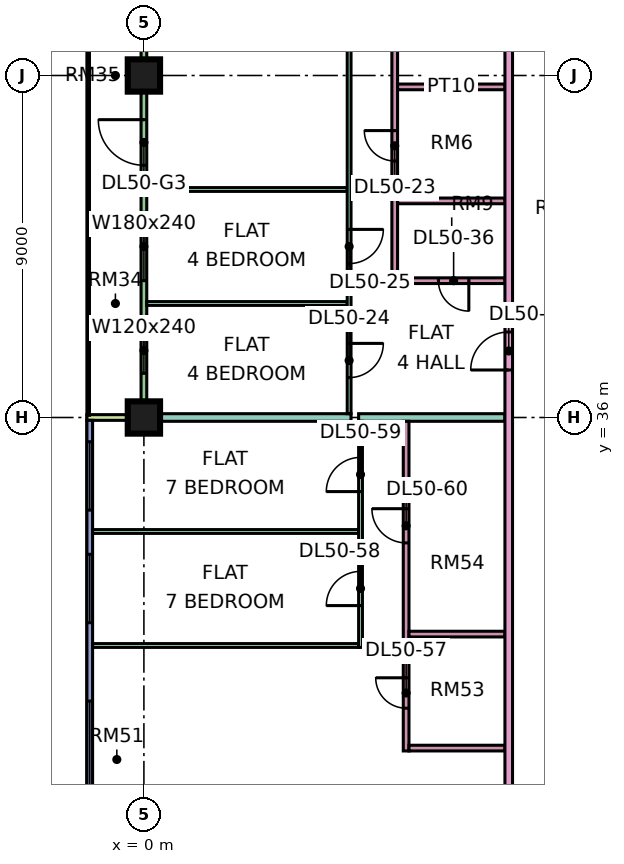
"""IFC4 building model, lengths in metres.
Left out: names, types, materials, properties, quantities, classifications, styles, units other than length and angle.
Written with IfcOpenShell. Run it as: python <this file> out.ifc"""

import sys

from ifc_helpers import new_model, si_unit, direction, frame, frame_2d, origin, origin_2d, place, context, subcontext, project, spatial, rectangle, extrude, element, fill, save


model = new_model("IFC4")
c1 = context("Model", 3, precision=1e-05, world=origin(), true_north=direction((0.0, 1.0)))
c2 = subcontext(c1, "Body", "Model", "MODEL_VIEW")
j1 = project(units=[si_unit("LENGTHUNIT", "METRE"), si_unit("PLANEANGLEUNIT", "RADIAN")], contexts=[c1])
p1 = place(None, origin())
s1 = spatial("IfcSite", under=j1, at=p1, CompositionType="ELEMENT")
p2 = place(p1, origin())
s2 = spatial("IfcBuilding", under=s1, at=p2, CompositionType="ELEMENT")
p3 = place(p2, frame((0.0, 0.0, 215.4)))
s3 = spatial("IfcBuildingStorey", under=s2, at=p3, CompositionType="ELEMENT", Elevation=215.4)
p4 = place(p3, frame((0.0, 36.0, 0.0), z_axis=(0.0, 0.0, 1.0), x_axis=(1.0, 0.0, 0.0)))
e1 = element("IfcColumn", 1, at=p4, inside=s3, PredefinedType="COLUMN", context=c2, shape_type="SweptSolid", body=[
    extrude(rectangle(XDim=0.85, YDim=0.85, at=origin_2d()), origin(), (0.0, 0.0, 1.0), 3.75),
])
p5 = place(p3, frame((0.0, 45.0, 0.0), z_axis=(0.0, 0.0, 1.0), x_axis=(1.0, 0.0, 0.0)))
e2 = element("IfcColumn", 2, at=p5, inside=s3, PredefinedType="COLUMN", context=c2, shape_type="SweptSolid", body=[
    extrude(rectangle(XDim=0.85, YDim=0.85, at=origin_2d()), origin(), (0.0, 0.0, 1.0), 3.75),
])
p6 = place(p3, frame((0.0, 47.925, 0.0), z_axis=(0.0, 0.0, 1.0), x_axis=(0.0, -1.0, 0.0)))
e3 = element("IfcWall", 3, at=p6, inside=s3, PredefinedType="SOLIDWALL", context=c2, shape_type="SweptSolid", body=[
    extrude(rectangle(XDim=11.85, YDim=0.15, at=frame_2d((5.925, 0.0))), origin(), (0.0, 0.0, 1.0), 3.35),
])
p7 = place(p6, frame((0.6, 0.0, 0.45)))
e4 = element("IfcOpeningElement", 4, at=p7, cuts=e3, PredefinedType="OPENING", context=c2, shape_type="SweptSolid", body=[
    extrude(rectangle(XDim=1.2, YDim=2.4, at=frame_2d((0.6, 1.2))), frame((0.0, 0.085, 0.0), z_axis=(0.0, -1.0, 0.0), x_axis=(1.0, 0.0, 0.0)), (0.0, 0.0, 1.0), 0.17),
])
p8 = place(p6, frame((4.087, 0.0, 0.0)))
e5 = element("IfcOpeningElement", 5, at=p8, cuts=e3, PredefinedType="OPENING", context=c2, shape_type="SweptSolid", body=[
    extrude(rectangle(XDim=1.2, YDim=2.4, at=frame_2d((0.6, 1.2))), frame((0.0, 0.085, 0.0), z_axis=(0.0, -1.0, 0.0), x_axis=(1.0, 0.0, 0.0)), (0.0, 0.0, 1.0), 0.17),
])
p9 = place(p6, frame((6.525, 0.0, 0.45)))
e6 = element("IfcOpeningElement", 6, at=p9, cuts=e3, PredefinedType="OPENING", context=c2, shape_type="SweptSolid", body=[
    extrude(rectangle(XDim=1.8, YDim=2.4, at=frame_2d((0.9, 1.2))), frame((0.0, 0.085, 0.0), z_axis=(0.0, -1.0, 0.0), x_axis=(1.0, 0.0, 0.0)), (0.0, 0.0, 1.0), 0.17),
])
p10 = place(p6, frame((9.562, 0.0, 0.45)))
e7 = element("IfcOpeningElement", 7, at=p10, cuts=e3, PredefinedType="OPENING", context=c2, shape_type="SweptSolid", body=[
    extrude(rectangle(XDim=1.2, YDim=2.4, at=frame_2d((0.6, 1.2))), frame((0.0, 0.085, 0.0), z_axis=(0.0, -1.0, 0.0), x_axis=(1.0, 0.0, 0.0)), (0.0, 0.0, 1.0), 0.17),
])
p11 = place(p3, frame((-1.5, 36.0, 0.0), z_axis=(0.0, 0.0, 1.0), x_axis=(1.0, 0.0, 0.0)))
e8 = element("IfcWall", 8, at=p11, inside=s3, PredefinedType="SOLIDWALL", context=c2, shape_type="SweptSolid", body=[
    extrude(rectangle(XDim=1.5, YDim=0.15, at=frame_2d((0.75, 0.0))), origin(), (0.0, 0.0, 1.0), 3.35),
])
p12 = place(p3, frame((-1.425, 35.925, 0.0), z_axis=(0.0, 0.0, 1.0), x_axis=(0.0, -1.0, 0.0)))
e9 = element("IfcWall", 9, at=p12, inside=s3, PredefinedType="SOLIDWALL", context=c2, shape_type="SweptSolid", body=[
    extrude(rectangle(XDim=11.85, YDim=0.15, at=frame_2d((5.925, 0.0))), origin(), (0.0, 0.0, 1.0), 3.35),
])
p13 = place(p12, frame((0.562, 0.0, 0.45)))
e10 = element("IfcOpeningElement", 10, at=p13, cuts=e9, PredefinedType="OPENING", context=c2, shape_type="SweptSolid", body=[
    extrude(rectangle(XDim=1.8, YDim=2.4, at=frame_2d((0.9, 1.2))), frame((0.0, 0.085, 0.0), z_axis=(0.0, -1.0, 0.0), x_axis=(1.0, 0.0, 0.0)), (0.0, 0.0, 1.0), 0.17),
])
p14 = place(p12, frame((3.525, 0.0, 0.45)))
e11 = element("IfcOpeningElement", 11, at=p14, cuts=e9, PredefinedType="OPENING", context=c2, shape_type="SweptSolid", body=[
    extrude(rectangle(XDim=1.8, YDim=2.4, at=frame_2d((0.9, 1.2))), frame((0.0, 0.085, 0.0), z_axis=(0.0, -1.0, 0.0), x_axis=(1.0, 0.0, 0.0)), (0.0, 0.0, 1.0), 0.17),
])
p15 = place(p12, frame((7.387, 0.0, 0.45)))
e12 = element("IfcOpeningElement", 12, at=p15, cuts=e9, PredefinedType="OPENING", context=c2, shape_type="SweptSolid", body=[
    extrude(rectangle(XDim=3.0, YDim=2.4, at=frame_2d((1.5, 1.2))), frame((0.0, 0.085, 0.0), z_axis=(0.0, -1.0, 0.0), x_axis=(1.0, 0.0, 0.0)), (0.0, 0.0, 1.0), 0.17),
])
p16 = place(p3, frame((-1.351, 33.0, 0.0), z_axis=(0.0, 0.0, 1.0), x_axis=(1.0, 0.0, 0.0)))
e13 = element("IfcWall", 13, at=p16, inside=s3, PredefinedType="PARTITIONING", context=c2, shape_type="SweptSolid", body=[
    extrude(rectangle(XDim=7.001, YDim=0.1, at=frame_2d((3.5, 0.0))), origin(), (0.0, 0.0, 1.0), 3.35),
])
p17 = place(p3, frame((-1.35, 30.0, 0.0), z_axis=(0.0, 0.0, 1.0), x_axis=(1.0, 0.0, 0.0)))
e14 = element("IfcWall", 14, at=p17, inside=s3, PredefinedType="PARTITIONING", context=c2, shape_type="SweptSolid", body=[
    extrude(rectangle(XDim=7.0, YDim=0.1, at=frame_2d((3.5, 0.0))), origin(), (0.0, 0.0, 1.0), 3.35),
])
e15 = element("IfcWall", 15, at=p4, inside=s3, PredefinedType="PARTITIONING", context=c2, shape_type="SweptSolid", body=[
    extrude(rectangle(XDim=5.45, YDim=0.2, at=frame_2d((2.725, 0.0))), origin(), (0.0, 0.0, 1.0), 3.35),
])
for number, where, z_axis, x_axis in (
    (16, (0.074, 39.0, 0.0), (0.0, 0.0, 1.0), (1.0, 0.0, 0.0)),
    (17, (0.074, 42.0, 0.0), (0.0, 0.0, 1.0), (1.0, 0.0, 0.0)),
):
    element("IfcWall", number, at=place(p3, frame(where, z_axis=z_axis, x_axis=x_axis)), inside=s3, PredefinedType="PARTITIONING", context=c2, shape_type="SweptSolid", body=[
        extrude(rectangle(XDim=5.276, YDim=0.1, at=frame_2d((2.638, 0.0))), origin(), (0.0, 0.0, 1.0), 3.35),
    ])
p18 = place(p3, frame((5.4, 36.1, 0.0), z_axis=(0.0, 0.0, 1.0), x_axis=(0.0, 1.0, 0.0)))
e18 = element("IfcWall", 18, at=p18, inside=s3, PredefinedType="PARTITIONING", context=c2, shape_type="SweptSolid", body=[
    extrude(rectangle(XDim=26.95, YDim=0.1, at=frame_2d((13.475, 0.0))), origin(), (0.0, 0.0, 1.0), 3.35),
])
p19 = place(p18, frame((0.95, 0.0, 0.0)))
e19 = element("IfcOpeningElement", 19, at=p19, cuts=e18, PredefinedType="OPENING", context=c2, shape_type="SweptSolid", body=[
    extrude(rectangle(XDim=0.9, YDim=2.1, at=frame_2d((0.45, 1.05))), frame((0.0, 0.06, 0.0), z_axis=(0.0, -1.0, 0.0), x_axis=(1.0, 0.0, 0.0)), (0.0, 0.0, 1.0), 0.12),
])
p20 = place(p18, frame((3.95, 0.0, 0.0)))
e20 = element("IfcOpeningElement", 20, at=p20, cuts=e18, PredefinedType="OPENING", context=c2, shape_type="SweptSolid", body=[
    extrude(rectangle(XDim=0.9, YDim=2.1, at=frame_2d((0.45, 1.05))), frame((0.0, 0.06, 0.0), z_axis=(0.0, -1.0, 0.0), x_axis=(1.0, 0.0, 0.0)), (0.0, 0.0, 1.0), 0.12),
])
p21 = place(p18, frame((15.95, 0.0, 0.0)))
e21 = element("IfcOpeningElement", 21, at=p21, cuts=e18, PredefinedType="OPENING", context=c2, shape_type="SweptSolid", body=[
    extrude(rectangle(XDim=0.9, YDim=2.1, at=frame_2d((0.45, 1.05))), frame((0.0, 0.06, 0.0), z_axis=(0.0, -1.0, 0.0), x_axis=(1.0, 0.0, 0.0)), (0.0, 0.0, 1.0), 0.12),
])
p22 = place(p18, frame((18.95, 0.0, 0.0)))
e22 = element("IfcOpeningElement", 22, at=p22, cuts=e18, PredefinedType="OPENING", context=c2, shape_type="SweptSolid", body=[
    extrude(rectangle(XDim=0.9, YDim=2.1, at=frame_2d((0.45, 1.05))), frame((0.0, 0.06, 0.0), z_axis=(0.0, -1.0, 0.0), x_axis=(1.0, 0.0, 0.0)), (0.0, 0.0, 1.0), 0.12),
])
p23 = place(p18, frame((21.95, 0.0, 0.0)))
e23 = element("IfcOpeningElement", 23, at=p23, cuts=e18, PredefinedType="OPENING", context=c2, shape_type="SweptSolid", body=[
    extrude(rectangle(XDim=0.9, YDim=2.1, at=frame_2d((0.45, 1.05))), frame((0.0, 0.06, 0.0), z_axis=(0.0, -1.0, 0.0), x_axis=(1.0, 0.0, 0.0)), (0.0, 0.0, 1.0), 0.12),
])
p24 = place(p18, frame((9.95, 0.0, 0.0)))
e24 = element("IfcOpeningElement", 24, at=p24, cuts=e18, PredefinedType="OPENING", context=c2, shape_type="SweptSolid", body=[
    extrude(rectangle(XDim=0.9, YDim=2.1, at=frame_2d((0.45, 1.05))), frame((0.0, 0.06, 0.0), z_axis=(0.0, -1.0, 0.0), x_axis=(1.0, 0.0, 0.0)), (0.0, 0.0, 1.0), 0.12),
])
p25 = place(p18, frame((24.55, 0.0, 0.0)))
e25 = element("IfcOpeningElement", 25, at=p25, cuts=e18, PredefinedType="OPENING", context=c2, shape_type="SweptSolid", body=[
    extrude(rectangle(XDim=1.6, YDim=2.1, at=frame_2d((0.8, 1.05))), frame((0.0, 0.06, 0.0), z_axis=(0.0, -1.0, 0.0), x_axis=(1.0, 0.0, 0.0)), (0.0, 0.0, 1.0), 0.12),
])
p26 = place(p3, frame((5.65, 36.0, 0.0), z_axis=(0.0, 0.0, 1.0), x_axis=(1.0, 0.0, 0.0)))
e26 = element("IfcWall", 26, at=p26, inside=s3, PredefinedType="PARTITIONING", context=c2, shape_type="SweptSolid", body=[
    extrude(rectangle(XDim=3.85, YDim=0.2, at=frame_2d((1.925, 0.0))), origin(), (0.0, 0.0, 1.0), 3.35),
])
p27 = place(p3, frame((5.7, 29.95, 0.0), z_axis=(0.0, 0.0, 1.0), x_axis=(0.0, 1.0, 0.0)))
e27 = element("IfcWall", 27, at=p27, inside=s3, PredefinedType="PARTITIONING", context=c2, shape_type="SweptSolid", body=[
    extrude(rectangle(XDim=5.95, YDim=0.1, at=frame_2d((2.975, 0.0))), origin(), (0.0, 0.0, 1.0), 3.35),
])
p28 = place(p27, frame((1.1, 0.0, 0.0)))
e28 = element("IfcOpeningElement", 28, at=p28, cuts=e27, PredefinedType="OPENING", context=c2, shape_type="SweptSolid", body=[
    extrude(rectangle(XDim=0.9, YDim=2.1, at=frame_2d((0.45, 1.05))), frame((0.0, 0.06, 0.0), z_axis=(0.0, -1.0, 0.0), x_axis=(1.0, 0.0, 0.0)), (0.0, 0.0, 1.0), 0.12),
])
p29 = place(p27, frame((4.1, 0.0, 0.0)))
e29 = element("IfcOpeningElement", 29, at=p29, cuts=e27, PredefinedType="OPENING", context=c2, shape_type="SweptSolid", body=[
    extrude(rectangle(XDim=0.9, YDim=2.1, at=frame_2d((0.45, 1.05))), frame((0.0, 0.06, 0.0), z_axis=(0.0, -1.0, 0.0), x_axis=(1.0, 0.0, 0.0)), (0.0, 0.0, 1.0), 0.12),
])
p30 = place(p3, frame((6.6, 39.525, 0.0), z_axis=(0.0, 0.0, 1.0), x_axis=(0.0, 1.0, 0.0)))
e30 = element("IfcWall", 30, at=p30, inside=s3, PredefinedType="PARTITIONING", context=c2, shape_type="SweptSolid", body=[
    extrude(rectangle(XDim=24.825, YDim=0.15, at=frame_2d((12.413, 0.0))), origin(), (0.0, 0.0, 1.0), 3.35),
])
p31 = place(p30, frame((3.225, 0.0, 0.0)))
e31 = element("IfcOpeningElement", 31, at=p31, cuts=e30, PredefinedType="OPENING", context=c2, shape_type="SweptSolid", body=[
    extrude(rectangle(XDim=0.8, YDim=2.1, at=frame_2d((0.4, 1.05))), frame((0.0, 0.085, 0.0), z_axis=(0.0, -1.0, 0.0), x_axis=(1.0, 0.0, 0.0)), (0.0, 0.0, 1.0), 0.17),
])
p32 = place(p30, frame((13.875, 0.0, 0.0)))
e32 = element("IfcOpeningElement", 32, at=p32, cuts=e30, PredefinedType="OPENING", context=c2, shape_type="SweptSolid", body=[
    extrude(rectangle(XDim=0.9, YDim=2.1, at=frame_2d((0.45, 1.05))), frame((0.0, 0.085, 0.0), z_axis=(0.0, -1.0, 0.0), x_axis=(1.0, 0.0, 0.0)), (0.0, 0.0, 1.0), 0.17),
])
p33 = place(p30, frame((6.225, 0.0, 0.0)))
e33 = element("IfcOpeningElement", 33, at=p33, cuts=e30, PredefinedType="OPENING", context=c2, shape_type="SweptSolid", body=[
    extrude(rectangle(XDim=0.8, YDim=2.1, at=frame_2d((0.4, 1.05))), frame((0.0, 0.085, 0.0), z_axis=(0.0, -1.0, 0.0), x_axis=(1.0, 0.0, 0.0)), (0.0, 0.0, 1.0), 0.17),
])
p34 = place(p30, frame((18.525, 0.0, 0.0)))
e34 = element("IfcOpeningElement", 34, at=p34, cuts=e30, PredefinedType="OPENING", context=c2, shape_type="SweptSolid", body=[
    extrude(rectangle(XDim=0.9, YDim=2.1, at=frame_2d((0.45, 1.05))), frame((0.0, 0.085, 0.0), z_axis=(0.0, -1.0, 0.0), x_axis=(1.0, 0.0, 0.0)), (0.0, 0.0, 1.0), 0.17),
])
p35 = place(p30, frame((21.675, 0.0, 0.0)))
e35 = element("IfcOpeningElement", 35, at=p35, cuts=e30, PredefinedType="OPENING", context=c2, shape_type="SweptSolid", body=[
    extrude(rectangle(XDim=0.9, YDim=2.1, at=frame_2d((0.45, 1.05))), frame((0.0, 0.085, 0.0), z_axis=(0.0, -1.0, 0.0), x_axis=(1.0, 0.0, 0.0)), (0.0, 0.0, 1.0), 0.17),
])
p36 = place(p30, frame((9.375, 0.0, 0.0)))
e36 = element("IfcOpeningElement", 36, at=p36, cuts=e30, PredefinedType="OPENING", context=c2, shape_type="SweptSolid", body=[
    extrude(rectangle(XDim=0.8, YDim=2.1, at=frame_2d((0.4, 1.05))), frame((0.0, 0.085, 0.0), z_axis=(0.0, -1.0, 0.0), x_axis=(1.0, 0.0, 0.0)), (0.0, 0.0, 1.0), 0.17),
])
p37 = place(p3, frame((6.675, 39.6, 0.0), z_axis=(0.0, 0.0, 1.0), x_axis=(1.0, 0.0, 0.0)))
e37 = element("IfcWall", 37, at=p37, inside=s3, PredefinedType="PARTITIONING", context=c2, shape_type="SweptSolid", body=[
    extrude(rectangle(XDim=2.825, YDim=0.15, at=frame_2d((1.413, 0.0))), origin(), (0.0, 0.0, 1.0), 3.35),
])
p38 = place(p37, frame((1.075, 0.0, 0.0)))
e38 = element("IfcOpeningElement", 38, at=p38, cuts=e37, PredefinedType="OPENING", context=c2, shape_type="SweptSolid", body=[
    extrude(rectangle(XDim=0.8, YDim=2.1, at=frame_2d((0.4, 1.05))), frame((0.0, 0.085, 0.0), z_axis=(0.0, -1.0, 0.0), x_axis=(1.0, 0.0, 0.0)), (0.0, 0.0, 1.0), 0.17),
])
for number, where, z_axis, x_axis in (
    (39, (6.675, 41.7, 0.0), (0.0, 0.0, 1.0), (1.0, 0.0, 0.0)),
    (40, (6.675, 44.7, 0.0), (0.0, 0.0, 1.0), (1.0, 0.0, 0.0)),
):
    element("IfcWall", number, at=place(p3, frame(where, z_axis=z_axis, x_axis=x_axis)), inside=s3, PredefinedType="PARTITIONING", context=c2, shape_type="SweptSolid", body=[
        extrude(rectangle(XDim=2.825, YDim=0.15, at=frame_2d((1.413, 0.0))), origin(), (0.0, 0.0, 1.0), 3.35),
    ])
p39 = place(p3, frame((6.9, 27.225, 0.0), z_axis=(0.0, 0.0, 1.0), x_axis=(0.0, 1.0, 0.0)))
e41 = element("IfcWall", 41, at=p39, inside=s3, PredefinedType="PARTITIONING", context=c2, shape_type="SweptSolid", body=[
    extrude(rectangle(XDim=8.675, YDim=0.15, at=frame_2d((4.337, 0.0))), origin(), (0.0, 0.0, 1.0), 3.35),
])
p40 = place(p39, frame((1.125, 0.0, 0.0)))
e42 = element("IfcOpeningElement", 42, at=p40, cuts=e41, PredefinedType="OPENING", context=c2, shape_type="SweptSolid", body=[
    extrude(rectangle(XDim=0.8, YDim=2.1, at=frame_2d((0.4, 1.05))), frame((0.0, 0.085, 0.0), z_axis=(0.0, -1.0, 0.0), x_axis=(1.0, 0.0, 0.0)), (0.0, 0.0, 1.0), 0.17),
])
p41 = place(p39, frame((5.475, 0.0, 0.0)))
e43 = element("IfcOpeningElement", 43, at=p41, cuts=e41, PredefinedType="OPENING", context=c2, shape_type="SweptSolid", body=[
    extrude(rectangle(XDim=0.9, YDim=2.1, at=frame_2d((0.45, 1.05))), frame((0.0, 0.085, 0.0), z_axis=(0.0, -1.0, 0.0), x_axis=(1.0, 0.0, 0.0)), (0.0, 0.0, 1.0), 0.17),
])
for number, where, z_axis, x_axis in (
    (44, (6.975, 27.3, 0.0), (0.0, 0.0, 1.0), (1.0, 0.0, 0.0)),
    (45, (6.975, 30.3, 0.0), (0.0, 0.0, 1.0), (1.0, 0.0, 0.0)),
):
    element("IfcWall", number, at=place(p3, frame(where, z_axis=z_axis, x_axis=x_axis)), inside=s3, PredefinedType="PARTITIONING", context=c2, shape_type="SweptSolid", body=[
        extrude(rectangle(XDim=2.525, YDim=0.15, at=frame_2d((1.262, 0.0))), origin(), (0.0, 0.0, 1.0), 3.35),
    ])
p42 = place(p3, frame((9.6, 20.0, 0.0), z_axis=(0.0, 0.0, 1.0), x_axis=(0.0, 1.0, 0.0)))
e46 = element("IfcWall", 46, at=p42, inside=s3, PredefinedType="PARTITIONING", context=c2, shape_type="SweptSolid", body=[
    extrude(rectangle(XDim=44.35, YDim=0.2, at=frame_2d((22.175, 0.0))), origin(), (0.0, 0.0, 1.0), 3.35),
])
p43 = place(p42, frame((17.25, 0.0, 0.0)))
e47 = element("IfcOpeningElement", 47, at=p43, cuts=e46, PredefinedType="OPENING", context=c2, shape_type="SweptSolid", body=[
    extrude(rectangle(XDim=1.0, YDim=2.1, at=frame_2d((0.5, 1.05))), frame((0.0, 0.11, 0.0), z_axis=(0.0, -1.0, 0.0), x_axis=(1.0, 0.0, 0.0)), (0.0, 0.0, 1.0), 0.22),
])
p44 = place(p42, frame((0.6, 0.0, 0.0)))
e48 = element("IfcOpeningElement", 48, at=p44, cuts=e46, PredefinedType="OPENING", context=c2, shape_type="SweptSolid", body=[
    extrude(rectangle(XDim=1.2, YDim=2.1, at=frame_2d((0.6, 1.05))), frame((0.0, 0.11, 0.0), z_axis=(0.0, -1.0, 0.0), x_axis=(1.0, 0.0, 0.0)), (0.0, 0.0, 1.0), 0.22),
])
p45 = place(p42, frame((4.35, 0.0, 0.0)))
e49 = element("IfcOpeningElement", 49, at=p45, cuts=e46, PredefinedType="OPENING", context=c2, shape_type="SweptSolid", body=[
    extrude(rectangle(XDim=1.0, YDim=2.1, at=frame_2d((0.5, 1.05))), frame((0.0, 0.11, 0.0), z_axis=(0.0, -1.0, 0.0), x_axis=(1.0, 0.0, 0.0)), (0.0, 0.0, 1.0), 0.22),
])
p46 = place(p8, frame((1.2, 0.0, 0.0), z_axis=(0.0, 0.0, 1.0), x_axis=(-1.0, 0.0, 0.0)))
e50 = element("IfcDoor", 50, at=p46, inside=s3, OperationType="DOUBLE_DOOR_SINGLE_SWING", PredefinedType="DOOR", context=c2, shape_type="SweptSolid", body=[
    extrude(rectangle(XDim=1.2, YDim=2.4, at=frame_2d((0.6, 1.2))), frame((0.0, 0.025, 0.0), z_axis=(0.0, -1.0, 0.0), x_axis=(1.0, 0.0, 0.0)), (0.0, 0.0, 1.0), 0.05),
])
fill(e5, e50)
p47 = place(p9, origin())
e51 = element("IfcWindow", 51, at=p47, inside=s3, PartitioningType="SINGLE_PANEL", PredefinedType="WINDOW", context=c2, shape_type="SweptSolid", body=[
    extrude(rectangle(XDim=1.8, YDim=2.4, at=frame_2d((0.9, 1.2))), frame((0.0, 0.03, 0.0), z_axis=(0.0, -1.0, 0.0), x_axis=(1.0, 0.0, 0.0)), (0.0, 0.0, 1.0), 0.06),
])
fill(e6, e51)
p48 = place(p10, origin())
e52 = element("IfcWindow", 52, at=p48, inside=s3, PartitioningType="SINGLE_PANEL", PredefinedType="WINDOW", context=c2, shape_type="SweptSolid", body=[
    extrude(rectangle(XDim=1.2, YDim=2.4, at=frame_2d((0.6, 1.2))), frame((0.0, 0.03, 0.0), z_axis=(0.0, -1.0, 0.0), x_axis=(1.0, 0.0, 0.0)), (0.0, 0.0, 1.0), 0.06),
])
fill(e7, e52)
p49 = place(p13, origin())
e53 = element("IfcWindow", 53, at=p49, inside=s3, PartitioningType="SINGLE_PANEL", PredefinedType="WINDOW", context=c2, shape_type="SweptSolid", body=[
    extrude(rectangle(XDim=1.8, YDim=2.4, at=frame_2d((0.9, 1.2))), frame((0.0, 0.03, 0.0), z_axis=(0.0, -1.0, 0.0), x_axis=(1.0, 0.0, 0.0)), (0.0, 0.0, 1.0), 0.06),
])
fill(e10, e53)
p50 = place(p14, origin())
e54 = element("IfcWindow", 54, at=p50, inside=s3, PartitioningType="SINGLE_PANEL", PredefinedType="WINDOW", context=c2, shape_type="SweptSolid", body=[
    extrude(rectangle(XDim=1.8, YDim=2.4, at=frame_2d((0.9, 1.2))), frame((0.0, 0.03, 0.0), z_axis=(0.0, -1.0, 0.0), x_axis=(1.0, 0.0, 0.0)), (0.0, 0.0, 1.0), 0.06),
])
fill(e11, e54)
p51 = place(p15, origin())
e55 = element("IfcWindow", 55, at=p51, inside=s3, PartitioningType="SINGLE_PANEL", PredefinedType="WINDOW", context=c2, shape_type="SweptSolid", body=[
    extrude(rectangle(XDim=3.0, YDim=2.4, at=frame_2d((1.5, 1.2))), frame((0.0, 0.03, 0.0), z_axis=(0.0, -1.0, 0.0), x_axis=(1.0, 0.0, 0.0)), (0.0, 0.0, 1.0), 0.06),
])
fill(e12, e55)
p52 = place(p31, frame((0.8, 0.0, 0.0), z_axis=(0.0, 0.0, 1.0), x_axis=(-1.0, 0.0, 0.0)))
e56 = element("IfcDoor", 56, at=p52, inside=s3, OperationType="SINGLE_SWING_RIGHT", PredefinedType="DOOR", context=c2, shape_type="SweptSolid", body=[
    extrude(rectangle(XDim=0.8, YDim=2.1, at=frame_2d((0.4, 1.05))), frame((0.0, 0.025, 0.0), z_axis=(0.0, -1.0, 0.0), x_axis=(1.0, 0.0, 0.0)), (0.0, 0.0, 1.0), 0.05),
])
fill(e31, e56)
p53 = place(p19, origin())
e57 = element("IfcDoor", 57, at=p53, inside=s3, OperationType="SINGLE_SWING_RIGHT", PredefinedType="DOOR", context=c2, shape_type="SweptSolid", body=[
    extrude(rectangle(XDim=0.9, YDim=2.1, at=frame_2d((0.45, 1.05))), frame((0.0, 0.025, 0.0), z_axis=(0.0, -1.0, 0.0), x_axis=(1.0, 0.0, 0.0)), (0.0, 0.0, 1.0), 0.05),
])
fill(e19, e57)
p54 = place(p20, origin())
e58 = element("IfcDoor", 58, at=p54, inside=s3, OperationType="SINGLE_SWING_RIGHT", PredefinedType="DOOR", context=c2, shape_type="SweptSolid", body=[
    extrude(rectangle(XDim=0.9, YDim=2.1, at=frame_2d((0.45, 1.05))), frame((0.0, 0.025, 0.0), z_axis=(0.0, -1.0, 0.0), x_axis=(1.0, 0.0, 0.0)), (0.0, 0.0, 1.0), 0.05),
])
fill(e20, e58)
p55 = place(p43, origin())
e59 = element("IfcDoor", 59, at=p55, inside=s3, OperationType="SINGLE_SWING_LEFT", PredefinedType="DOOR", context=c2, shape_type="SweptSolid", body=[
    extrude(rectangle(XDim=1.0, YDim=2.1, at=frame_2d((0.5, 1.05))), frame((0.0, 0.025, 0.0), z_axis=(0.0, -1.0, 0.0), x_axis=(1.0, 0.0, 0.0)), (0.0, 0.0, 1.0), 0.05),
])
fill(e47, e59)
p56 = place(p38, origin())
e60 = element("IfcDoor", 60, at=p56, inside=s3, OperationType="SINGLE_SWING_RIGHT", PredefinedType="DOOR", context=c2, shape_type="SweptSolid", body=[
    extrude(rectangle(XDim=0.8, YDim=2.1, at=frame_2d((0.4, 1.05))), frame((0.0, 0.025, 0.0), z_axis=(0.0, -1.0, 0.0), x_axis=(1.0, 0.0, 0.0)), (0.0, 0.0, 1.0), 0.05),
])
fill(e38, e60)
p57 = place(p40, frame((0.8, 0.0, 0.0), z_axis=(0.0, 0.0, 1.0), x_axis=(-1.0, 0.0, 0.0)))
e61 = element("IfcDoor", 61, at=p57, inside=s3, OperationType="SINGLE_SWING_RIGHT", PredefinedType="DOOR", context=c2, shape_type="SweptSolid", body=[
    extrude(rectangle(XDim=0.8, YDim=2.1, at=frame_2d((0.4, 1.05))), frame((0.0, 0.025, 0.0), z_axis=(0.0, -1.0, 0.0), x_axis=(1.0, 0.0, 0.0)), (0.0, 0.0, 1.0), 0.05),
])
fill(e42, e61)
p58 = place(p28, origin())
e62 = element("IfcDoor", 62, at=p58, inside=s3, OperationType="SINGLE_SWING_LEFT", PredefinedType="DOOR", context=c2, shape_type="SweptSolid", body=[
    extrude(rectangle(XDim=0.9, YDim=2.1, at=frame_2d((0.45, 1.05))), frame((0.0, 0.025, 0.0), z_axis=(0.0, -1.0, 0.0), x_axis=(1.0, 0.0, 0.0)), (0.0, 0.0, 1.0), 0.05),
])
fill(e28, e62)
p59 = place(p29, origin())
e63 = element("IfcDoor", 63, at=p59, inside=s3, OperationType="SINGLE_SWING_LEFT", PredefinedType="DOOR", context=c2, shape_type="SweptSolid", body=[
    extrude(rectangle(XDim=0.9, YDim=2.1, at=frame_2d((0.45, 1.05))), frame((0.0, 0.025, 0.0), z_axis=(0.0, -1.0, 0.0), x_axis=(1.0, 0.0, 0.0)), (0.0, 0.0, 1.0), 0.05),
])
fill(e29, e63)
p60 = place(p41, frame((0.9, 0.0, 0.0), z_axis=(0.0, 0.0, 1.0), x_axis=(-1.0, 0.0, 0.0)))
e64 = element("IfcDoor", 64, at=p60, inside=s3, OperationType="SINGLE_SWING_RIGHT", PredefinedType="DOOR", context=c2, shape_type="SweptSolid", body=[
    extrude(rectangle(XDim=0.9, YDim=2.1, at=frame_2d((0.45, 1.05))), frame((0.0, 0.025, 0.0), z_axis=(0.0, -1.0, 0.0), x_axis=(1.0, 0.0, 0.0)), (0.0, 0.0, 1.0), 0.05),
])
fill(e43, e64)
save(model, sys.argv[1])
